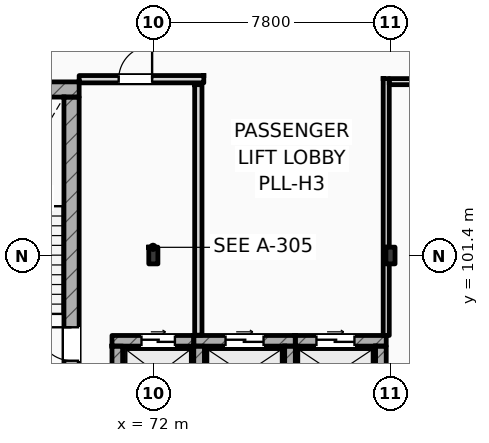
"""IFC4 building model, lengths in metres.
Left out: names, types, materials, properties, quantities, classifications, styles, units other than length and angle.
Written with IfcOpenShell. Run it as: python <this file> out.ifc"""

import sys

from ifc_helpers import new_model, si_unit, direction, frame, frame_2d, origin, origin_2d, place, context, subcontext, project, spatial, rectangle, i_section, extrude, element, fill, save


model = new_model("IFC4")
c1 = context("Model", 3, precision=1e-05, world=origin(), true_north=direction((0.0, 1.0)))
c2 = subcontext(c1, "Body", "Model", "MODEL_VIEW")
j1 = project(units=[si_unit("LENGTHUNIT", "METRE"), si_unit("PLANEANGLEUNIT", "RADIAN")], contexts=[c1])
p1 = place(None, origin())
s1 = spatial("IfcSite", under=j1, at=p1, CompositionType="ELEMENT")
p2 = place(p1, origin())
s2 = spatial("IfcBuilding", under=s1, at=p2, CompositionType="ELEMENT")
p3 = place(p2, frame((0.0, 0.0, 20.4)))
s3 = spatial("IfcBuildingStorey", under=s2, at=p3, CompositionType="ELEMENT", Elevation=20.4)
for number, where, z_axis, x_axis in (
    (1, (72.0, 101.4, 0.0), (0.0, 0.0, 1.0), (1.0, 0.0, 0.0)),
    (2, (79.8, 101.4, 0.0), (0.0, 0.0, 1.0), (1.0, 0.0, 0.0)),
):
    element("IfcColumn", number, at=place(p3, frame(where, z_axis=z_axis, x_axis=x_axis)), inside=s3, PredefinedType="COLUMN", context=c2, shape_type="SweptSolid", body=[
        extrude(i_section(OverallWidth=0.3, OverallDepth=0.55, WebThickness=0.015, FlangeThickness=0.029, FilletRadius=0.027, at=origin_2d()), origin(), (0.0, 0.0, 1.0), 4.2),
    ])
p4 = place(p3, frame((64.4, 106.862, 0.0), z_axis=(0.0, 0.0, 1.0), x_axis=(1.0, 0.0, 0.0)))
e3 = element("IfcWall", 3, at=p4, inside=s3, PredefinedType="SHEAR", context=c2, shape_type="SweptSolid", body=[
    extrude(rectangle(XDim=5.16, YDim=0.5, at=frame_2d((2.58, 0.0))), origin(), (0.0, 0.0, 1.0), 4.2),
])
p5 = place(p3, frame((69.31, 97.5, 0.0), z_axis=(0.0, 0.0, 1.0), x_axis=(0.0, 1.0, 0.0)))
e4 = element("IfcWall", 4, at=p5, inside=s3, PredefinedType="SHEAR", context=c2, shape_type="SweptSolid", body=[
    extrude(rectangle(XDim=9.112, YDim=0.5, at=frame_2d((4.556, 0.0))), origin(), (0.0, 0.0, 1.0), 4.2),
])
p6 = place(p5, frame((0.44, 0.0, 0.0)))
e5 = element("IfcOpeningElement", 5, at=p6, cuts=e4, PredefinedType="OPENING", context=c2, shape_type="SweptSolid", body=[
    extrude(rectangle(XDim=1.1, YDim=2.2, at=frame_2d((0.55, 1.1))), frame((0.0, 0.26, 0.0), z_axis=(0.0, -1.0, 0.0), x_axis=(1.0, 0.0, 0.0)), (0.0, 0.0, 1.0), 0.52),
])
p7 = place(p3, frame((70.64, 98.595, 0.0), z_axis=(0.0, 0.0, 1.0), x_axis=(1.0, 0.0, 0.0)))
e6 = element("IfcWall", 6, at=p7, inside=s3, PredefinedType="SHEAR", context=c2, shape_type="SweptSolid", body=[
    extrude(rectangle(XDim=2.69, YDim=0.35, at=frame_2d((1.345, 0.0))), origin(), (0.0, 0.0, 1.0), 3.94),
])
p8 = place(p7, frame((0.97, 0.0, 0.0)))
e7 = element("IfcOpeningElement", 7, at=p8, cuts=e6, PredefinedType="OPENING", context=c2, shape_type="SweptSolid", body=[
    extrude(rectangle(XDim=1.1, YDim=2.2, at=frame_2d((0.55, 1.1))), frame((0.0, 0.185, 0.0), z_axis=(0.0, -1.0, 0.0), x_axis=(1.0, 0.0, 0.0)), (0.0, 0.0, 1.0), 0.37),
])
p9 = place(p3, frame((70.815, 96.58, 0.0), z_axis=(0.0, 0.0, 1.0), x_axis=(0.0, 1.0, 0.0)))
e8 = element("IfcWall", 8, at=p9, inside=s3, PredefinedType="SHEAR", context=c2, shape_type="SweptSolid", body=[
    extrude(rectangle(XDim=1.84, YDim=0.35, at=frame_2d((0.92, 0.0))), origin(), (0.0, 0.0, 1.0), 3.94),
])
p10 = place(p3, frame((73.33, 98.595, 0.0), z_axis=(0.0, 0.0, 1.0), x_axis=(1.0, 0.0, 0.0)))
e9 = element("IfcWall", 9, at=p10, inside=s3, PredefinedType="SHEAR", context=c2, shape_type="SweptSolid", body=[
    extrude(rectangle(XDim=3.34, YDim=0.35, at=frame_2d((1.67, 0.0))), origin(), (0.0, 0.0, 1.0), 3.94),
])
p11 = place(p10, frame((1.045, 0.0, 0.0)))
e10 = element("IfcOpeningElement", 10, at=p11, cuts=e9, PredefinedType="OPENING", context=c2, shape_type="SweptSolid", body=[
    extrude(rectangle(XDim=1.25, YDim=2.25, at=frame_2d((0.625, 1.125))), frame((0.0, 0.185, 0.0), z_axis=(0.0, -1.0, 0.0), x_axis=(1.0, 0.0, 0.0)), (0.0, 0.0, 1.0), 0.37),
])
for number, where, z_axis, x_axis in (
    (11, (73.505, 96.58, 0.0), (0.0, 0.0, 1.0), (0.0, 1.0, 0.0)),
    (12, (76.495, 96.58, 0.0), (0.0, 0.0, 1.0), (0.0, 1.0, 0.0)),
):
    element("IfcWall", number, at=place(p3, frame(where, z_axis=z_axis, x_axis=x_axis)), inside=s3, PredefinedType="SHEAR", context=c2, shape_type="SweptSolid", body=[
        extrude(rectangle(XDim=1.84, YDim=0.35, at=frame_2d((0.92, 0.0))), origin(), (0.0, 0.0, 1.0), 3.94),
    ])
p12 = place(p3, frame((76.67, 98.595, 0.0), z_axis=(0.0, 0.0, 1.0), x_axis=(1.0, 0.0, 0.0)))
e13 = element("IfcWall", 13, at=p12, inside=s3, PredefinedType="SHEAR", context=c2, shape_type="SweptSolid", body=[
    extrude(rectangle(XDim=2.99, YDim=0.35, at=frame_2d((1.495, 0.0))), origin(), (0.0, 0.0, 1.0), 3.94),
])
p13 = place(p12, frame((0.695, 0.0, 0.0)))
e14 = element("IfcOpeningElement", 14, at=p13, cuts=e13, PredefinedType="OPENING", context=c2, shape_type="SweptSolid", body=[
    extrude(rectangle(XDim=1.25, YDim=2.25, at=frame_2d((0.625, 1.125))), frame((0.0, 0.185, 0.0), z_axis=(0.0, -1.0, 0.0), x_axis=(1.0, 0.0, 0.0)), (0.0, 0.0, 1.0), 0.37),
])
p14 = place(p3, frame((79.485, 96.58, 0.0), z_axis=(0.0, 0.0, 1.0), x_axis=(0.0, 1.0, 0.0)))
e15 = element("IfcWall", 15, at=p14, inside=s3, PredefinedType="SHEAR", context=c2, shape_type="SweptSolid", body=[
    extrude(rectangle(XDim=1.84, YDim=0.35, at=frame_2d((0.92, 0.0))), origin(), (0.0, 0.0, 1.0), 3.53),
])
p15 = place(p3, frame((73.48, 98.78, 0.0), z_axis=(0.0, 0.0, 1.0), x_axis=(0.0, 1.0, 0.0)))
e16 = element("IfcWall", 16, at=p15, inside=s3, PredefinedType="STANDARD", context=c2, shape_type="SweptSolid", body=[
    extrude(rectangle(XDim=8.24, YDim=0.24, at=frame_2d((4.12, 0.0))), origin(), (0.0, 0.0, 1.0), 3.94),
])
p16 = place(p3, frame((69.56, 107.2, 0.0), z_axis=(0.0, 0.0, 1.0), x_axis=(1.0, 0.0, 0.0)))
e17 = element("IfcWall", 17, at=p16, inside=s3, PredefinedType="STANDARD", context=c2, shape_type="SweptSolid", body=[
    extrude(rectangle(XDim=4.1, YDim=0.24, at=frame_2d((2.05, 0.0))), origin(), (0.0, 0.0, 1.0), 3.94),
])
p17 = place(p16, frame((1.3, 0.0, 0.0)))
e18 = element("IfcOpeningElement", 18, at=p17, cuts=e17, PredefinedType="OPENING", context=c2, shape_type="SweptSolid", body=[
    extrude(rectangle(XDim=1.1, YDim=2.2, at=frame_2d((0.55, 1.1))), frame((0.0, 0.13, 0.0), z_axis=(0.0, -1.0, 0.0), x_axis=(1.0, 0.0, 0.0)), (0.0, 0.0, 1.0), 0.26),
])
p18 = place(p3, frame((79.76, 107.12, 0.0), z_axis=(0.0, 0.0, 1.0), x_axis=(1.0, 0.0, 0.0)))
e19 = element("IfcWall", 19, at=p18, inside=s3, PredefinedType="PARTITIONING", context=c2, shape_type="SweptSolid", body=[
    extrude(rectangle(XDim=40.1, YDim=0.2, at=frame_2d((20.05, 0.0))), origin(), (0.0, 0.0, 1.0), 3.94),
])
p19 = place(p18, frame((9.35, 0.0, 0.0)))
e20 = element("IfcOpeningElement", 20, at=p19, cuts=e19, PredefinedType="OPENING", context=c2, shape_type="SweptSolid", body=[
    extrude(rectangle(XDim=1.3, YDim=2.2, at=frame_2d((0.65, 1.1))), frame((0.0, 0.11, 0.0), z_axis=(0.0, -1.0, 0.0), x_axis=(1.0, 0.0, 0.0)), (0.0, 0.0, 1.0), 0.22),
])
p20 = place(p18, frame((28.85, 0.0, 0.0)))
e21 = element("IfcOpeningElement", 21, at=p20, cuts=e19, PredefinedType="OPENING", context=c2, shape_type="SweptSolid", body=[
    extrude(rectangle(XDim=1.3, YDim=2.2, at=frame_2d((0.65, 1.1))), frame((0.0, 0.11, 0.0), z_axis=(0.0, -1.0, 0.0), x_axis=(1.0, 0.0, 0.0)), (0.0, 0.0, 1.0), 0.22),
])
p21 = place(p3, frame((79.66, 98.77, 0.0), z_axis=(0.0, 0.0, 1.0), x_axis=(0.0, 1.0, 0.0)))
e22 = element("IfcWall", 22, at=p21, inside=s3, PredefinedType="PARTITIONING", context=c2, shape_type="SweptSolid", body=[
    extrude(rectangle(XDim=8.45, YDim=0.2, at=frame_2d((4.225, 0.0))), origin(), (0.0, 0.0, 1.0), 3.53),
])
p22 = place(p6, origin())
e23 = element("IfcDoor", 23, at=p22, inside=s3, OperationType="SINGLE_SWING_RIGHT", PredefinedType="DOOR", context=c2, shape_type="SweptSolid", body=[
    extrude(rectangle(XDim=1.1, YDim=2.2, at=frame_2d((0.55, 1.1))), frame((0.0, 0.025, 0.0), z_axis=(0.0, -1.0, 0.0), x_axis=(1.0, 0.0, 0.0)), (0.0, 0.0, 1.0), 0.05),
])
fill(e5, e23)
p23 = place(p8, origin())
e24 = element("IfcDoor", 24, at=p23, inside=s3, OperationType="SLIDING_TO_LEFT", PredefinedType="DOOR", context=c2, shape_type="SweptSolid", body=[
    extrude(rectangle(XDim=1.1, YDim=2.2, at=frame_2d((0.55, 1.1))), frame((0.0, 0.025, 0.0), z_axis=(0.0, -1.0, 0.0), x_axis=(1.0, 0.0, 0.0)), (0.0, 0.0, 1.0), 0.05),
])
fill(e7, e24)
p24 = place(p11, origin())
e25 = element("IfcDoor", 25, at=p24, inside=s3, OperationType="SLIDING_TO_LEFT", PredefinedType="DOOR", context=c2, shape_type="SweptSolid", body=[
    extrude(rectangle(XDim=1.25, YDim=2.25, at=frame_2d((0.625, 1.125))), frame((0.0, 0.025, 0.0), z_axis=(0.0, -1.0, 0.0), x_axis=(1.0, 0.0, 0.0)), (0.0, 0.0, 1.0), 0.05),
])
fill(e10, e25)
p25 = place(p13, origin())
e26 = element("IfcDoor", 26, at=p25, inside=s3, OperationType="SLIDING_TO_LEFT", PredefinedType="DOOR", context=c2, shape_type="SweptSolid", body=[
    extrude(rectangle(XDim=1.25, YDim=2.25, at=frame_2d((0.625, 1.125))), frame((0.0, 0.025, 0.0), z_axis=(0.0, -1.0, 0.0), x_axis=(1.0, 0.0, 0.0)), (0.0, 0.0, 1.0), 0.05),
])
fill(e14, e26)
p26 = place(p17, origin())
e27 = element("IfcDoor", 27, at=p26, inside=s3, OperationType="SINGLE_SWING_RIGHT", PredefinedType="DOOR", context=c2, shape_type="SweptSolid", body=[
    extrude(rectangle(XDim=1.1, YDim=2.2, at=frame_2d((0.55, 1.1))), frame((0.0, 0.025, 0.0), z_axis=(0.0, -1.0, 0.0), x_axis=(1.0, 0.0, 0.0)), (0.0, 0.0, 1.0), 0.05),
])
fill(e18, e27)
save(model, sys.argv[1])
